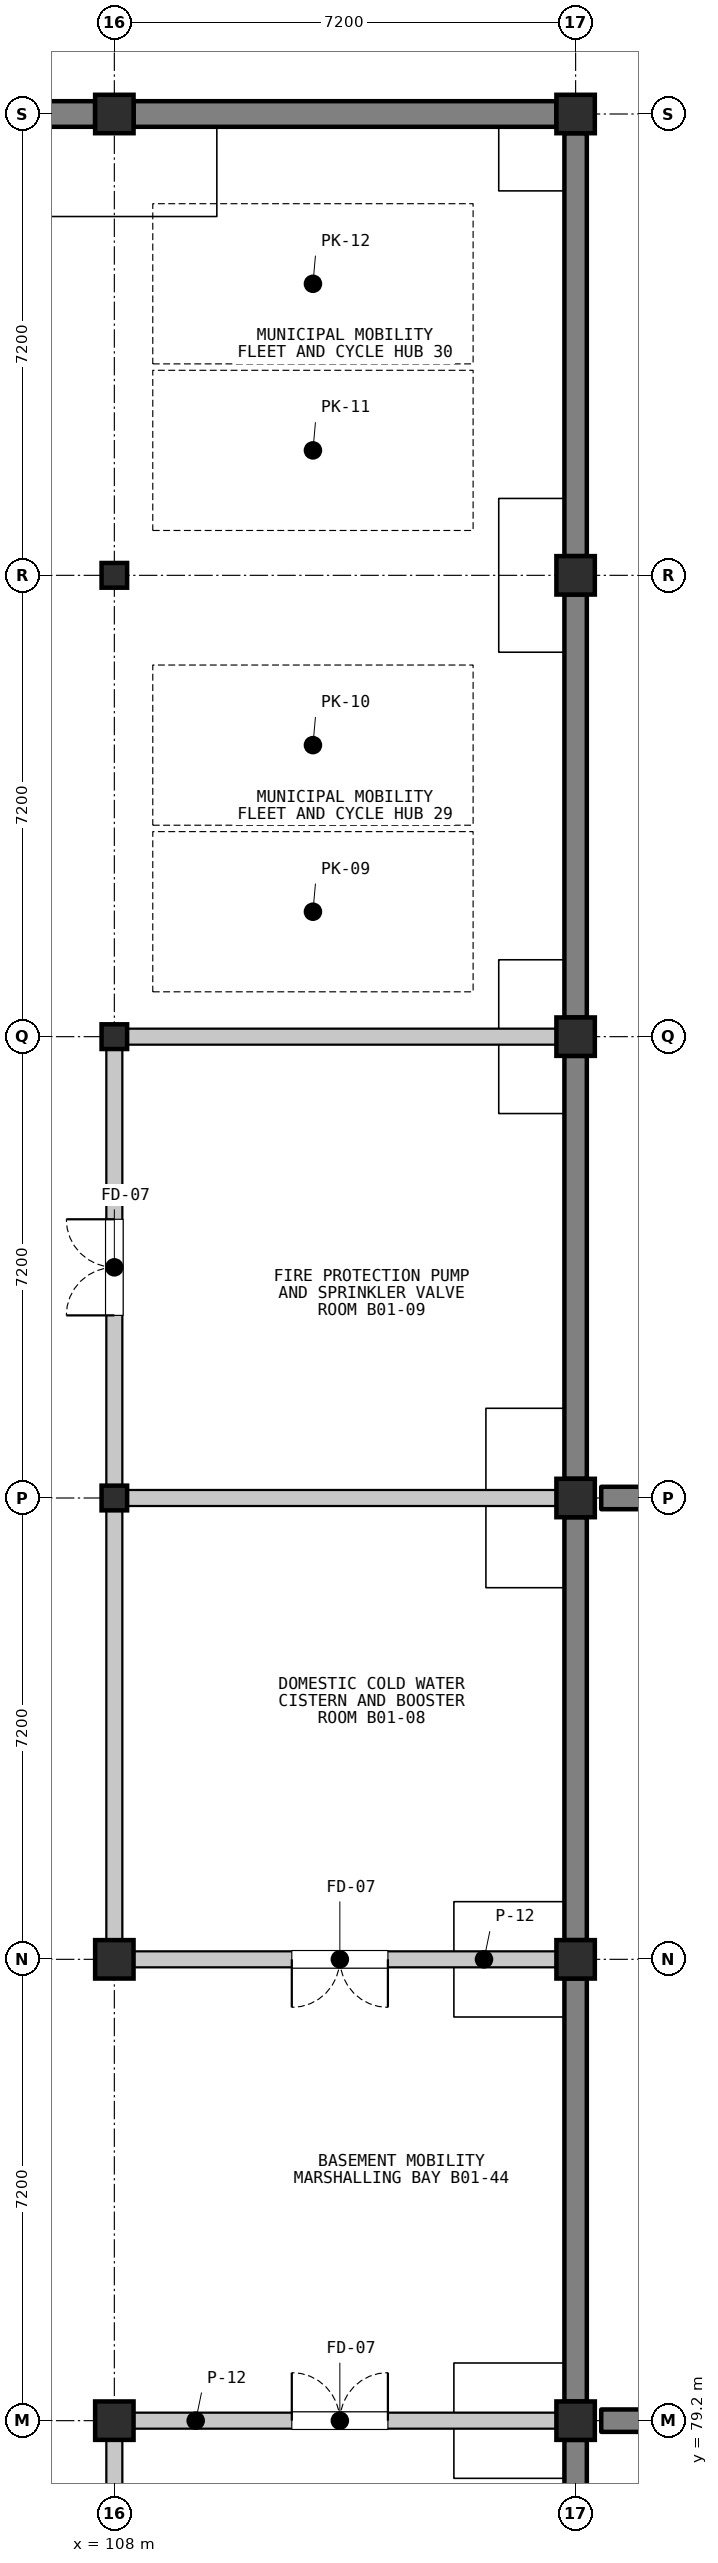
"""IFC4 building model, lengths in metres.
Left out: names, types, materials, properties, quantities, classifications, styles, units other than length and angle.
Written with IfcOpenShell. Run it as: python <this file> out.ifc"""

import sys

from ifc_helpers import new_model, si_unit, direction, frame, frame_2d, origin, origin_2d, place, context, subcontext, project, spatial, rectangle, i_section, extrude, element, fill, save


model = new_model("IFC4")
c1 = context("Model", 3, precision=1e-05, world=origin(), true_north=direction((0.0, 1.0)))
c2 = subcontext(c1, "Body", "Model", "MODEL_VIEW")
j1 = project(units=[si_unit("LENGTHUNIT", "METRE"), si_unit("PLANEANGLEUNIT", "RADIAN")], contexts=[c1])
p1 = place(None, origin())
s1 = spatial("IfcSite", under=j1, at=p1, CompositionType="ELEMENT")
p2 = place(p1, origin())
s2 = spatial("IfcBuilding", under=s1, at=p2, CompositionType="ELEMENT")
p3 = place(p2, frame((0.0, 0.0, -4.2)))
s3 = spatial("IfcBuildingStorey", under=s2, at=p3, CompositionType="ELEMENT", Elevation=-4.2)
p4 = place(p3, frame((101.1, 115.2, 0.0), z_axis=(0.0, 0.0, 1.0), x_axis=(1.0, 0.0, 0.0)))
e1 = element("IfcWall", 1, at=p4, inside=s3, PredefinedType="USERDEFINED", context=c2, shape_type="SweptSolid", body=[
    extrude(rectangle(XDim=6.6, YDim=0.4, at=frame_2d((3.3, 0.0))), origin(), (0.0, 0.0, 1.0), 3.98),
])
p5 = place(p3, frame((115.2, 72.3, 0.0), z_axis=(0.0, 0.0, 1.0), x_axis=(0.0, 1.0, 0.0)))
e2 = element("IfcWall", 2, at=p5, inside=s3, PredefinedType="USERDEFINED", context=c2, shape_type="SweptSolid", body=[
    extrude(rectangle(XDim=6.6, YDim=0.35, at=frame_2d((3.3, 0.0))), origin(), (0.0, 0.0, 1.0), 3.98),
])
for number, where, z_axis, x_axis in (
    (3, (115.2, 79.5, 0.0), (0.0, 0.0, 1.0), (0.0, 1.0, 0.0)),
    (4, (115.2, 86.7, 0.0), (0.0, 0.0, 1.0), (0.0, 1.0, 0.0)),
    (5, (115.2, 93.9, 0.0), (0.0, 0.0, 1.0), (0.0, 1.0, 0.0)),
):
    element("IfcWall", number, at=place(p3, frame(where, z_axis=z_axis, x_axis=x_axis)), inside=s3, PredefinedType="USERDEFINED", context=c2, shape_type="SweptSolid", body=[
        extrude(rectangle(XDim=6.6, YDim=0.35, at=frame_2d((3.3, 0.0))), origin(), (0.0, 0.0, 1.0), 3.98),
    ])
p6 = place(p3, frame((115.2, 101.1, 0.0), z_axis=(0.0, 0.0, 1.0), x_axis=(0.0, 1.0, 0.0)))
e6 = element("IfcWall", 6, at=p6, inside=s3, PredefinedType="USERDEFINED", context=c2, shape_type="SweptSolid", body=[
    extrude(rectangle(XDim=6.6, YDim=0.35, at=frame_2d((3.3, 0.0))), origin(), (0.0, 0.0, 1.0), 3.98),
])
p7 = place(p3, frame((108.3, 115.2, 0.0), z_axis=(0.0, 0.0, 1.0), x_axis=(1.0, 0.0, 0.0)))
e7 = element("IfcWall", 7, at=p7, inside=s3, PredefinedType="USERDEFINED", context=c2, shape_type="SweptSolid", body=[
    extrude(rectangle(XDim=6.6, YDim=0.4, at=frame_2d((3.3, 0.0))), origin(), (0.0, 0.0, 1.0), 3.98),
])
p8 = place(p3, frame((115.2, 108.3, 0.0), z_axis=(0.0, 0.0, 1.0), x_axis=(0.0, 1.0, 0.0)))
e8 = element("IfcWall", 8, at=p8, inside=s3, PredefinedType="USERDEFINED", context=c2, shape_type="SweptSolid", body=[
    extrude(rectangle(XDim=6.6, YDim=0.35, at=frame_2d((3.3, 0.0))), origin(), (0.0, 0.0, 1.0), 3.98),
])
for number, where, z_axis, x_axis in (
    (9, (115.6, 79.2, 0.0), (0.0, 0.0, 1.0), (1.0, 0.0, 0.0)),
    (10, (115.6, 93.6, 0.0), (0.0, 0.0, 1.0), (1.0, 0.0, 0.0)),
):
    element("IfcWall", number, at=place(p3, frame(where, z_axis=z_axis, x_axis=x_axis)), inside=s3, PredefinedType="USERDEFINED", context=c2, shape_type="SweptSolid", body=[
        extrude(rectangle(XDim=6.4, YDim=0.35, at=frame_2d((3.2, 0.0))), origin(), (0.0, 0.0, 1.0), 3.98),
    ])
for number, where, z_axis, x_axis in (
    (11, (108.0, 79.2, 0.0), (0.0, 0.0, 1.0), (1.0, 0.0, 0.0)),
    (12, (108.0, 86.4, 0.0), (0.0, 0.0, 1.0), (1.0, 0.0, 0.0)),
):
    element("IfcColumn", number, at=place(p3, frame(where, z_axis=z_axis, x_axis=x_axis)), inside=s3, PredefinedType="COLUMN", context=c2, shape_type="SweptSolid", body=[
        extrude(rectangle(XDim=0.6, YDim=0.6, at=origin_2d()), origin(), (0.0, 0.0, 1.0), 4.2),
    ])
for number, where, z_axis, x_axis in (
    (13, (108.0, 93.6, 0.0), (0.0, 0.0, 1.0), (1.0, 0.0, 0.0)),
    (14, (108.0, 100.8, 0.0), (0.0, 0.0, 1.0), (1.0, 0.0, 0.0)),
    (15, (108.0, 108.0, 0.0), (0.0, 0.0, 1.0), (1.0, 0.0, 0.0)),
):
    element("IfcColumn", number, at=place(p3, frame(where, z_axis=z_axis, x_axis=x_axis)), inside=s3, PredefinedType="COLUMN", context=c2, shape_type="SweptSolid", body=[
        extrude(i_section(OverallWidth=0.399, OverallDepth=0.386, WebThickness=0.021, FlangeThickness=0.033, FilletRadius=0.015, at=origin_2d()), origin(), (0.0, 0.0, 1.0), 4.2),
    ])
for number, where, z_axis, x_axis in (
    (16, (108.0, 115.2, 0.0), (0.0, 0.0, 1.0), (1.0, 0.0, 0.0)),
    (17, (115.2, 79.2, 0.0), (0.0, 0.0, 1.0), (1.0, 0.0, 0.0)),
    (18, (115.2, 86.4, 0.0), (0.0, 0.0, 1.0), (1.0, 0.0, 0.0)),
    (19, (115.2, 93.6, 0.0), (0.0, 0.0, 1.0), (1.0, 0.0, 0.0)),
    (20, (115.2, 100.8, 0.0), (0.0, 0.0, 1.0), (1.0, 0.0, 0.0)),
    (21, (115.2, 108.0, 0.0), (0.0, 0.0, 1.0), (1.0, 0.0, 0.0)),
    (22, (115.2, 115.2, 0.0), (0.0, 0.0, 1.0), (1.0, 0.0, 0.0)),
):
    element("IfcColumn", number, at=place(p3, frame(where, z_axis=z_axis, x_axis=x_axis)), inside=s3, PredefinedType="COLUMN", context=c2, shape_type="SweptSolid", body=[
        extrude(rectangle(XDim=0.6, YDim=0.6, at=origin_2d()), origin(), (0.0, 0.0, 1.0), 4.2),
    ])
p9 = place(p3, frame((108.12, 79.2, 0.0), z_axis=(0.0, 0.0, 1.0), x_axis=(1.0, 0.0, 0.0)))
e23 = element("IfcWall", 23, at=p9, inside=s3, PredefinedType="PARTITIONING", context=c2, shape_type="SweptSolid", body=[
    extrude(rectangle(XDim=6.8, YDim=0.25, at=frame_2d((3.4, 0.0))), origin(), (0.0, 0.0, 1.0), 3.208),
])
p10 = place(p9, frame((2.65, 0.0, 0.0)))
e24 = element("IfcOpeningElement", 24, at=p10, cuts=e23, PredefinedType="OPENING", context=c2, shape_type="SweptSolid", body=[
    extrude(rectangle(XDim=1.5, YDim=2.25, at=frame_2d((0.75, 1.125))), frame((0.0, 0.135, 0.0), z_axis=(0.0, -1.0, 0.0), x_axis=(1.0, 0.0, 0.0)), (0.0, 0.0, 1.0), 0.27),
])
p11 = place(p3, frame((108.0, 72.12, 0.0), z_axis=(0.0, 0.0, 1.0), x_axis=(0.0, 1.0, 0.0)))
e25 = element("IfcWall", 25, at=p11, inside=s3, PredefinedType="PARTITIONING", context=c2, shape_type="SweptSolid", body=[
    extrude(rectangle(XDim=6.96, YDim=0.25, at=frame_2d((3.48, 0.0))), origin(), (0.0, 0.0, 1.0), 3.208),
])
p12 = place(p3, frame((114.92, 86.4, 0.0), z_axis=(0.0, 0.0, 1.0), x_axis=(-1.0, 0.0, 0.0)))
e26 = element("IfcWall", 26, at=p12, inside=s3, PredefinedType="PARTITIONING", context=c2, shape_type="SweptSolid", body=[
    extrude(rectangle(XDim=6.8, YDim=0.25, at=frame_2d((3.4, 0.0))), origin(), (0.0, 0.0, 1.0), 3.208),
])
p13 = place(p12, frame((2.65, 0.0, 0.0)))
e27 = element("IfcOpeningElement", 27, at=p13, cuts=e26, PredefinedType="OPENING", context=c2, shape_type="SweptSolid", body=[
    extrude(rectangle(XDim=1.5, YDim=2.25, at=frame_2d((0.75, 1.125))), frame((0.0, 0.135, 0.0), z_axis=(0.0, -1.0, 0.0), x_axis=(1.0, 0.0, 0.0)), (0.0, 0.0, 1.0), 0.27),
])
p14 = place(p3, frame((108.12, 93.6, 0.0), z_axis=(0.0, 0.0, 1.0), x_axis=(1.0, 0.0, 0.0)))
e28 = element("IfcWall", 28, at=p14, inside=s3, PredefinedType="PARTITIONING", context=c2, shape_type="SweptSolid", body=[
    extrude(rectangle(XDim=6.8, YDim=0.25, at=frame_2d((3.4, 0.0))), origin(), (0.0, 0.0, 1.0), 3.368),
])
p15 = place(p3, frame((108.0, 86.52, 0.0), z_axis=(0.0, 0.0, 1.0), x_axis=(0.0, 1.0, 0.0)))
e29 = element("IfcWall", 29, at=p15, inside=s3, PredefinedType="PARTITIONING", context=c2, shape_type="SweptSolid", body=[
    extrude(rectangle(XDim=6.96, YDim=0.25, at=frame_2d((3.48, 0.0))), origin(), (0.0, 0.0, 1.0), 3.208),
])
p16 = place(p3, frame((108.0, 93.72, 0.0), z_axis=(0.0, 0.0, 1.0), x_axis=(0.0, 1.0, 0.0)))
e30 = element("IfcWall", 30, at=p16, inside=s3, PredefinedType="PARTITIONING", context=c2, shape_type="SweptSolid", body=[
    extrude(rectangle(XDim=6.96, YDim=0.25, at=frame_2d((3.48, 0.0))), origin(), (0.0, 0.0, 1.0), 3.368),
])
p17 = place(p16, frame((2.73, 0.0, 0.0)))
e31 = element("IfcOpeningElement", 31, at=p17, cuts=e30, PredefinedType="OPENING", context=c2, shape_type="SweptSolid", body=[
    extrude(rectangle(XDim=1.5, YDim=2.25, at=frame_2d((0.75, 1.125))), frame((0.0, 0.135, 0.0), z_axis=(0.0, -1.0, 0.0), x_axis=(1.0, 0.0, 0.0)), (0.0, 0.0, 1.0), 0.27),
])
p18 = place(p3, frame((108.12, 100.8, 0.0), z_axis=(0.0, 0.0, 1.0), x_axis=(1.0, 0.0, 0.0)))
e32 = element("IfcWall", 32, at=p18, inside=s3, PredefinedType="PARTITIONING", context=c2, shape_type="SweptSolid", body=[
    extrude(rectangle(XDim=6.96, YDim=0.25, at=frame_2d((3.48, 0.0))), origin(), (0.0, 0.0, 1.0), 3.368),
])
p19 = place(p10, origin())
e33 = element("IfcDoor", 33, at=p19, inside=s3, OperationType="DOUBLE_DOOR_SINGLE_SWING", PredefinedType="DOOR", context=c2, shape_type="SweptSolid", body=[
    extrude(rectangle(XDim=1.5, YDim=2.25, at=frame_2d((0.75, 1.125))), frame((0.0, 0.025, 0.0), z_axis=(0.0, -1.0, 0.0), x_axis=(1.0, 0.0, 0.0)), (0.0, 0.0, 1.0), 0.05),
])
fill(e24, e33)
p20 = place(p13, origin())
e34 = element("IfcDoor", 34, at=p20, inside=s3, OperationType="DOUBLE_DOOR_SINGLE_SWING", PredefinedType="DOOR", context=c2, shape_type="SweptSolid", body=[
    extrude(rectangle(XDim=1.5, YDim=2.25, at=frame_2d((0.75, 1.125))), frame((0.0, 0.025, 0.0), z_axis=(0.0, -1.0, 0.0), x_axis=(1.0, 0.0, 0.0)), (0.0, 0.0, 1.0), 0.05),
])
fill(e27, e34)
p21 = place(p17, origin())
e35 = element("IfcDoor", 35, at=p21, inside=s3, OperationType="DOUBLE_DOOR_SINGLE_SWING", PredefinedType="DOOR", context=c2, shape_type="SweptSolid", body=[
    extrude(rectangle(XDim=1.5, YDim=2.25, at=frame_2d((0.75, 1.125))), frame((0.0, 0.025, 0.0), z_axis=(0.0, -1.0, 0.0), x_axis=(1.0, 0.0, 0.0)), (0.0, 0.0, 1.0), 0.05),
])
fill(e31, e35)
save(model, sys.argv[1])
